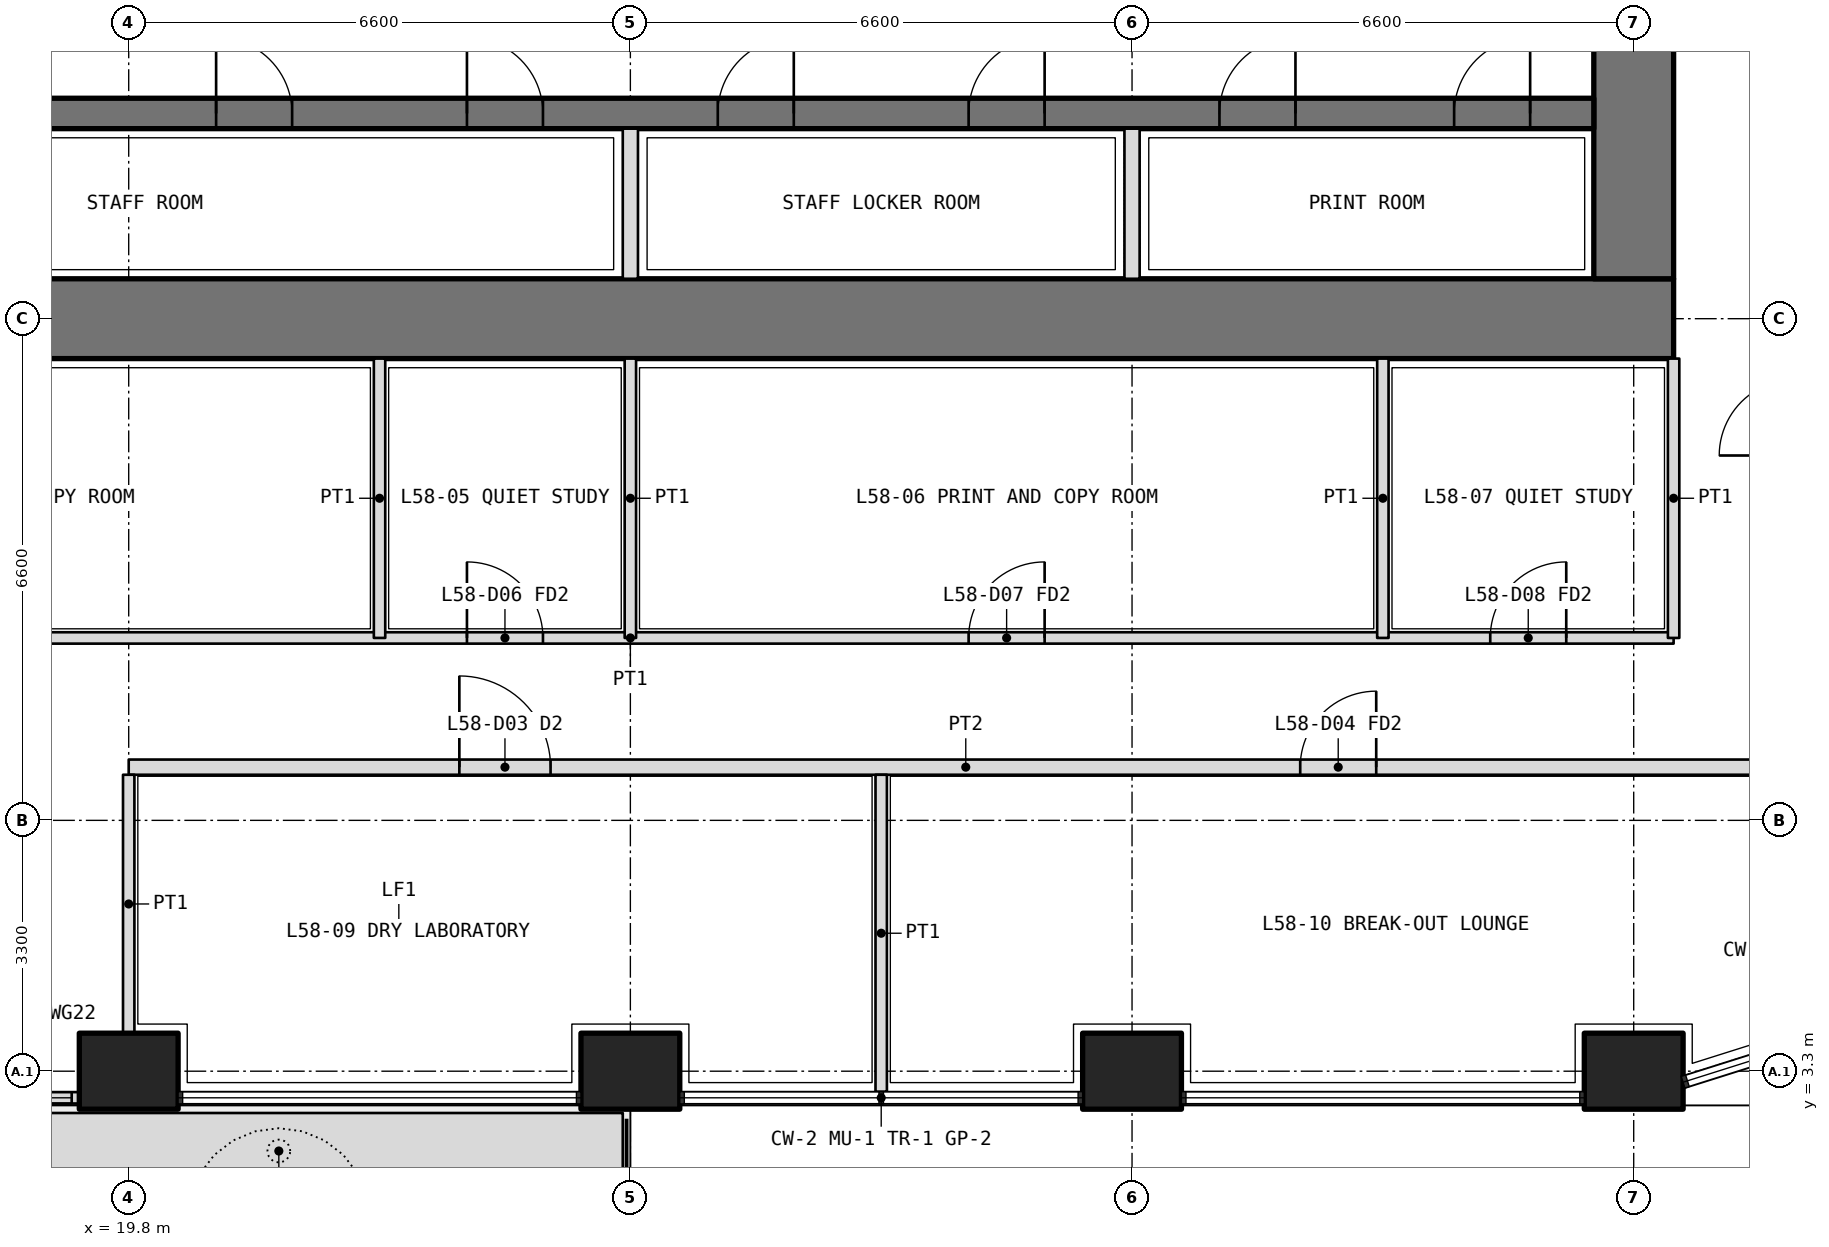
"""IFC4 building model, lengths in metres.
Left out: names, types, materials, properties, quantities, classifications, styles, units other than length and angle.
Written with IfcOpenShell. Run it as: python <this file> out.ifc"""

import sys

from ifc_helpers import new_model, si_unit, direction, frame, frame_2d, origin, origin_2d, place, context, subcontext, project, spatial, polyline, rectangle, outline, extrude, element, fill, save


model = new_model("IFC4")
c1 = context("Model", 3, precision=1e-05, world=origin(), true_north=direction((0.0, 1.0)))
c2 = subcontext(c1, "Body", "Model", "MODEL_VIEW")
j1 = project(units=[si_unit("LENGTHUNIT", "METRE"), si_unit("PLANEANGLEUNIT", "RADIAN")], contexts=[c1])
p1 = place(None, origin())
s1 = spatial("IfcSite", under=j1, at=p1, CompositionType="ELEMENT")
p2 = place(p1, origin())
s2 = spatial("IfcBuilding", under=s1, at=p2, CompositionType="ELEMENT")
p3 = place(p2, frame((0.0, 0.0, 254.4)))
s3 = spatial("IfcBuildingStorey", under=s2, at=p3, CompositionType="ELEMENT", Elevation=254.4)
for number, where, z_axis, x_axis in (
    (1, (19.8, 3.3, 0.0), (0.0, 0.0, 1.0), (1.0, 0.0, 0.0)),
    (2, (26.4, 3.3, 0.0), (0.0, 0.0, 1.0), (1.0, 0.0, 0.0)),
    (3, (33.0, 3.3, 0.0), (0.0, 0.0, 1.0), (1.0, 0.0, 0.0)),
    (4, (39.6, 3.3, 0.0), (0.0, 0.0, 1.0), (1.0, 0.0, 0.0)),
):
    element("IfcColumn", number, at=place(p3, frame(where, z_axis=z_axis, x_axis=x_axis)), inside=s3, PredefinedType="COLUMN", context=c2, shape_type="SweptSolid", body=[
        extrude(rectangle(XDim=1.3, YDim=1.0, at=origin_2d()), origin(), (0.0, 0.0, 1.0), 4.2),
    ])
p4 = place(p3, origin())
e5 = element("IfcWall", 5, at=p4, inside=s3, PredefinedType="USERDEFINED", context=c2, shape_type="SweptSolid", body=[
    extrude(outline(polyline([(17.25, 1.75), (26.3, 1.75), (26.3, 2.75), (17.25, 2.75), (17.25, 1.75)]), holes=[polyline([(17.4, 1.9), (26.15, 1.9), (26.15, 2.6), (17.4, 2.6), (17.4, 1.9)])]), origin(), (0.0, 0.0, 1.0), 1.05),
])
p5 = place(p3, frame((13.85, 2.95, 0.0), z_axis=(0.0, 0.0, 1.0), x_axis=(1.0, 0.0, 0.0)))
e6 = element("IfcWall", 6, at=p5, inside=s3, PredefinedType="SOLIDWALL", context=c2, shape_type="SweptSolid", body=[
    extrude(rectangle(XDim=5.3, YDim=0.15, at=frame_2d((2.65, 0.0))), origin(), (0.0, 0.0, 1.0), 2.7),
])
p6 = place(p5, frame((2.9, 0.0, 0.0)))
e7 = element("IfcOpeningElement", 7, at=p6, cuts=e6, PredefinedType="OPENING", context=c2, shape_type="SweptSolid", body=[
    extrude(rectangle(XDim=1.0, YDim=2.4, at=frame_2d((0.5, 1.2))), frame((0.0, 0.085, 0.0), z_axis=(0.0, -1.0, 0.0), x_axis=(1.0, 0.0, 0.0)), (0.0, 0.0, 1.0), 0.17),
])
p7 = place(p5, frame((0.1, 0.0, 0.1)))
e8 = element("IfcOpeningElement", 8, at=p7, cuts=e6, PredefinedType="OPENING", context=c2, shape_type="SweptSolid", body=[
    extrude(rectangle(XDim=2.3, YDim=2.3, at=frame_2d((1.15, 1.15))), frame((0.0, 0.085, 0.0), z_axis=(0.0, -1.0, 0.0), x_axis=(1.0, 0.0, 0.0)), (0.0, 0.0, 1.0), 0.17),
])
p8 = place(p5, frame((4.0, 0.0, 0.1)))
e9 = element("IfcOpeningElement", 9, at=p8, cuts=e6, PredefinedType="OPENING", context=c2, shape_type="SweptSolid", body=[
    extrude(rectangle(XDim=1.2, YDim=2.3, at=frame_2d((0.6, 1.15))), frame((0.0, 0.085, 0.0), z_axis=(0.0, -1.0, 0.0), x_axis=(1.0, 0.0, 0.0)), (0.0, 0.0, 1.0), 0.17),
])
p9 = place(p3, frame((12.675, 13.2, 0.0), z_axis=(0.0, 0.0, 1.0), x_axis=(1.0, 0.0, 0.0)))
e10 = element("IfcWall", 10, at=p9, inside=s3, PredefinedType="SHEAR", context=c2, shape_type="SweptSolid", body=[
    extrude(rectangle(XDim=27.45, YDim=1.05, at=frame_2d((13.725, 0.0))), origin(), (0.0, 0.0, 1.0), 4.2),
])
p10 = place(p3, frame((39.6, 13.725, 0.0), z_axis=(0.0, 0.0, 1.0), x_axis=(0.0, 1.0, 0.0)))
e11 = element("IfcWall", 11, at=p10, inside=s3, PredefinedType="SHEAR", context=c2, shape_type="SweptSolid", body=[
    extrude(rectangle(XDim=18.75, YDim=1.05, at=frame_2d((9.375, 0.0))), origin(), (0.0, 0.0, 1.0), 4.2),
])
p11 = place(p10, frame((3.025, 0.0, 0.0)))
e12 = element("IfcOpeningElement", 12, at=p11, cuts=e11, PredefinedType="OPENING", context=c2, shape_type="SweptSolid", body=[
    extrude(rectangle(XDim=1.6, YDim=2.1, at=frame_2d((0.8, 1.05))), frame((0.0, 0.535, 0.0), z_axis=(0.0, -1.0, 0.0), x_axis=(1.0, 0.0, 0.0)), (0.0, 0.0, 1.0), 1.07),
])
p12 = place(p10, frame((13.825, 0.0, 0.0)))
e13 = element("IfcOpeningElement", 13, at=p12, cuts=e11, PredefinedType="OPENING", context=c2, shape_type="SweptSolid", body=[
    extrude(rectangle(XDim=1.6, YDim=2.1, at=frame_2d((0.8, 1.05))), frame((0.0, 0.535, 0.0), z_axis=(0.0, -1.0, 0.0), x_axis=(1.0, 0.0, 0.0)), (0.0, 0.0, 1.0), 1.07),
])
p13 = place(p3, frame((13.725, 15.9, 0.0), z_axis=(0.0, 0.0, 1.0), x_axis=(1.0, 0.0, 0.0)))
e14 = element("IfcWall", 14, at=p13, inside=s3, PredefinedType="SHEAR", context=c2, shape_type="SweptSolid", body=[
    extrude(rectangle(XDim=25.35, YDim=0.4, at=frame_2d((12.675, 0.0))), origin(), (0.0, 0.0, 1.0), 4.2),
])
p14 = place(p13, frame((0.837, 0.0, 0.0)))
e15 = element("IfcOpeningElement", 15, at=p14, cuts=e14, PredefinedType="OPENING", context=c2, shape_type="SweptSolid", body=[
    extrude(rectangle(XDim=1.0, YDim=2.1, at=frame_2d((0.5, 1.05))), frame((0.0, 0.21, 0.0), z_axis=(0.0, -1.0, 0.0), x_axis=(1.0, 0.0, 0.0)), (0.0, 0.0, 1.0), 0.42),
])
p15 = place(p13, frame((3.925, 0.0, 0.0)))
e16 = element("IfcOpeningElement", 16, at=p15, cuts=e14, PredefinedType="OPENING", context=c2, shape_type="SweptSolid", body=[
    extrude(rectangle(XDim=1.0, YDim=2.1, at=frame_2d((0.5, 1.05))), frame((0.0, 0.21, 0.0), z_axis=(0.0, -1.0, 0.0), x_axis=(1.0, 0.0, 0.0)), (0.0, 0.0, 1.0), 0.42),
])
p16 = place(p13, frame((7.225, 0.0, 0.0)))
e17 = element("IfcOpeningElement", 17, at=p16, cuts=e14, PredefinedType="OPENING", context=c2, shape_type="SweptSolid", body=[
    extrude(rectangle(XDim=1.0, YDim=2.1, at=frame_2d((0.5, 1.05))), frame((0.0, 0.21, 0.0), z_axis=(0.0, -1.0, 0.0), x_axis=(1.0, 0.0, 0.0)), (0.0, 0.0, 1.0), 0.42),
])
p17 = place(p13, frame((10.525, 0.0, 0.0)))
e18 = element("IfcOpeningElement", 18, at=p17, cuts=e14, PredefinedType="OPENING", context=c2, shape_type="SweptSolid", body=[
    extrude(rectangle(XDim=1.0, YDim=2.1, at=frame_2d((0.5, 1.05))), frame((0.0, 0.21, 0.0), z_axis=(0.0, -1.0, 0.0), x_axis=(1.0, 0.0, 0.0)), (0.0, 0.0, 1.0), 0.42),
])
p18 = place(p13, frame((13.825, 0.0, 0.0)))
e19 = element("IfcOpeningElement", 19, at=p18, cuts=e14, PredefinedType="OPENING", context=c2, shape_type="SweptSolid", body=[
    extrude(rectangle(XDim=1.0, YDim=2.1, at=frame_2d((0.5, 1.05))), frame((0.0, 0.21, 0.0), z_axis=(0.0, -1.0, 0.0), x_axis=(1.0, 0.0, 0.0)), (0.0, 0.0, 1.0), 0.42),
])
p19 = place(p13, frame((17.125, 0.0, 0.0)))
e20 = element("IfcOpeningElement", 20, at=p19, cuts=e14, PredefinedType="OPENING", context=c2, shape_type="SweptSolid", body=[
    extrude(rectangle(XDim=1.0, YDim=2.1, at=frame_2d((0.5, 1.05))), frame((0.0, 0.21, 0.0), z_axis=(0.0, -1.0, 0.0), x_axis=(1.0, 0.0, 0.0)), (0.0, 0.0, 1.0), 0.42),
])
p20 = place(p13, frame((20.425, 0.0, 0.0)))
e21 = element("IfcOpeningElement", 21, at=p20, cuts=e14, PredefinedType="OPENING", context=c2, shape_type="SweptSolid", body=[
    extrude(rectangle(XDim=1.0, YDim=2.1, at=frame_2d((0.5, 1.05))), frame((0.0, 0.21, 0.0), z_axis=(0.0, -1.0, 0.0), x_axis=(1.0, 0.0, 0.0)), (0.0, 0.0, 1.0), 0.42),
])
p21 = place(p13, frame((23.512, 0.0, 0.0)))
e22 = element("IfcOpeningElement", 22, at=p21, cuts=e14, PredefinedType="OPENING", context=c2, shape_type="SweptSolid", body=[
    extrude(rectangle(XDim=1.0, YDim=2.1, at=frame_2d((0.5, 1.05))), frame((0.0, 0.21, 0.0), z_axis=(0.0, -1.0, 0.0), x_axis=(1.0, 0.0, 0.0)), (0.0, 0.0, 1.0), 0.42),
])
for number, where, z_axis, x_axis in (
    (23, (26.4, 13.725, 0.0), (0.0, 0.0, 1.0), (0.0, 1.0, 0.0)),
    (24, (33.0, 13.725, 0.0), (0.0, 0.0, 1.0), (0.0, 1.0, 0.0)),
):
    element("IfcWall", number, at=place(p3, frame(where, z_axis=z_axis, x_axis=x_axis)), inside=s3, PredefinedType="PARTITIONING", context=c2, shape_type="SweptSolid", body=[
        extrude(rectangle(XDim=1.975, YDim=0.2, at=frame_2d((0.987, 0.0))), origin(), (0.0, 0.0, 1.0), 4.2),
    ])
p22 = place(p3, frame((12.675, 9.0, 0.0), z_axis=(0.0, 0.0, 1.0), x_axis=(1.0, 0.0, 0.0)))
e25 = element("IfcWall", 25, at=p22, inside=s3, PredefinedType="PARTITIONING", context=c2, shape_type="SweptSolid", body=[
    extrude(rectangle(XDim=27.45, YDim=0.15, at=frame_2d((13.725, 0.0))), origin(), (0.0, 0.0, 1.0), 3.0),
])
p23 = place(p22, frame((4.712, 0.0, 0.0)))
e26 = element("IfcOpeningElement", 26, at=p23, cuts=e25, PredefinedType="OPENING", context=c2, shape_type="SweptSolid", body=[
    extrude(rectangle(XDim=1.0, YDim=2.1, at=frame_2d((0.5, 1.05))), frame((0.0, 0.085, 0.0), z_axis=(0.0, -1.0, 0.0), x_axis=(1.0, 0.0, 0.0)), (0.0, 0.0, 1.0), 0.17),
])
p24 = place(p22, frame((11.575, 0.0, 0.0)))
e27 = element("IfcOpeningElement", 27, at=p24, cuts=e25, PredefinedType="OPENING", context=c2, shape_type="SweptSolid", body=[
    extrude(rectangle(XDim=1.0, YDim=2.1, at=frame_2d((0.5, 1.05))), frame((0.0, 0.085, 0.0), z_axis=(0.0, -1.0, 0.0), x_axis=(1.0, 0.0, 0.0)), (0.0, 0.0, 1.0), 0.17),
])
p25 = place(p22, frame((18.175, 0.0, 0.0)))
e28 = element("IfcOpeningElement", 28, at=p25, cuts=e25, PredefinedType="OPENING", context=c2, shape_type="SweptSolid", body=[
    extrude(rectangle(XDim=1.0, YDim=2.1, at=frame_2d((0.5, 1.05))), frame((0.0, 0.085, 0.0), z_axis=(0.0, -1.0, 0.0), x_axis=(1.0, 0.0, 0.0)), (0.0, 0.0, 1.0), 0.17),
])
p26 = place(p22, frame((25.038, 0.0, 0.0)))
e29 = element("IfcOpeningElement", 29, at=p26, cuts=e25, PredefinedType="OPENING", context=c2, shape_type="SweptSolid", body=[
    extrude(rectangle(XDim=1.0, YDim=2.1, at=frame_2d((0.5, 1.05))), frame((0.0, 0.085, 0.0), z_axis=(0.0, -1.0, 0.0), x_axis=(1.0, 0.0, 0.0)), (0.0, 0.0, 1.0), 0.17),
])
p27 = place(p3, frame((40.125, 12.675, 0.0), z_axis=(0.0, 0.0, 1.0), x_axis=(0.0, -1.0, 0.0)))
e30 = element("IfcWall", 30, at=p27, inside=s3, PredefinedType="PARTITIONING", context=c2, shape_type="SweptSolid", body=[
    extrude(rectangle(XDim=3.675, YDim=0.15, at=frame_2d((1.837, 0.0))), origin(), (0.0, 0.0, 1.0), 3.0),
])
p28 = place(p3, frame((23.1, 12.675, 0.0), z_axis=(0.0, 0.0, 1.0), x_axis=(0.0, -1.0, 0.0)))
e31 = element("IfcWall", 31, at=p28, inside=s3, PredefinedType="PARTITIONING", context=c2, shape_type="SweptSolid", body=[
    extrude(rectangle(XDim=3.675, YDim=0.15, at=frame_2d((1.837, 0.0))), origin(), (0.0, 0.0, 1.0), 3.9),
])
p29 = place(p3, frame((26.4, 12.675, 0.0), z_axis=(0.0, 0.0, 1.0), x_axis=(0.0, -1.0, 0.0)))
e32 = element("IfcWall", 32, at=p29, inside=s3, PredefinedType="PARTITIONING", context=c2, shape_type="SweptSolid", body=[
    extrude(rectangle(XDim=3.675, YDim=0.15, at=frame_2d((1.837, 0.0))), origin(), (0.0, 0.0, 1.0), 3.0),
])
p30 = place(p3, frame((36.3, 12.675, 0.0), z_axis=(0.0, 0.0, 1.0), x_axis=(0.0, -1.0, 0.0)))
e33 = element("IfcWall", 33, at=p30, inside=s3, PredefinedType="PARTITIONING", context=c2, shape_type="SweptSolid", body=[
    extrude(rectangle(XDim=3.675, YDim=0.15, at=frame_2d((1.837, 0.0))), origin(), (0.0, 0.0, 1.0), 3.9),
])
p31 = place(p3, frame((19.8, 7.3, 0.0), z_axis=(0.0, 0.0, 1.0), x_axis=(1.0, 0.0, 0.0)))
e34 = element("IfcWall", 34, at=p31, inside=s3, PredefinedType="PARTITIONING", context=c2, shape_type="SweptSolid", body=[
    extrude(rectangle(XDim=22.025, YDim=0.2, at=frame_2d((11.012, 0.0))), origin(), (0.0, 0.0, 1.0), 3.0),
])
p32 = place(p31, frame((4.35, 0.0, 0.0)))
e35 = element("IfcOpeningElement", 35, at=p32, cuts=e34, PredefinedType="OPENING", context=c2, shape_type="SweptSolid", body=[
    extrude(rectangle(XDim=1.2, YDim=2.1, at=frame_2d((0.6, 1.05))), frame((0.0, 0.11, 0.0), z_axis=(0.0, -1.0, 0.0), x_axis=(1.0, 0.0, 0.0)), (0.0, 0.0, 1.0), 0.22),
])
p33 = place(p31, frame((15.413, 0.0, 0.0)))
e36 = element("IfcOpeningElement", 36, at=p33, cuts=e34, PredefinedType="OPENING", context=c2, shape_type="SweptSolid", body=[
    extrude(rectangle(XDim=1.0, YDim=2.1, at=frame_2d((0.5, 1.05))), frame((0.0, 0.11, 0.0), z_axis=(0.0, -1.0, 0.0), x_axis=(1.0, 0.0, 0.0)), (0.0, 0.0, 1.0), 0.22),
])
p34 = place(p3, frame((19.8, 3.8, 0.0), z_axis=(0.0, 0.0, 1.0), x_axis=(0.0, 1.0, 0.0)))
e37 = element("IfcWall", 37, at=p34, inside=s3, PredefinedType="PARTITIONING", context=c2, shape_type="SweptSolid", body=[
    extrude(rectangle(XDim=3.4, YDim=0.15, at=frame_2d((1.7, 0.0))), origin(), (0.0, 0.0, 1.0), 3.0),
])
p35 = place(p3, frame((29.7, 3.03, 0.0), z_axis=(0.0, 0.0, 1.0), x_axis=(0.0, 1.0, 0.0)))
e38 = element("IfcWall", 38, at=p35, inside=s3, PredefinedType="PARTITIONING", context=c2, shape_type="SweptSolid", body=[
    extrude(rectangle(XDim=4.17, YDim=0.15, at=frame_2d((2.085, 0.0))), origin(), (0.0, 0.0, 1.0), 2.7),
])
p36 = place(p8, origin())
e39 = element("IfcWindow", 39, at=p36, inside=s3, PartitioningType="SINGLE_PANEL", PredefinedType="WINDOW", context=c2, shape_type="SweptSolid", body=[
    extrude(rectangle(XDim=1.2, YDim=2.3, at=frame_2d((0.6, 1.15))), frame((0.0, 0.03, 0.0), z_axis=(0.0, -1.0, 0.0), x_axis=(1.0, 0.0, 0.0)), (0.0, 0.0, 1.0), 0.06),
])
fill(e9, e39)
p37 = place(p24, origin())
e40 = element("IfcDoor", 40, at=p37, inside=s3, OperationType="SINGLE_SWING_LEFT", PredefinedType="DOOR", context=c2, shape_type="SweptSolid", body=[
    extrude(rectangle(XDim=1.0, YDim=2.1, at=frame_2d((0.5, 1.05))), frame((0.0, 0.025, 0.0), z_axis=(0.0, -1.0, 0.0), x_axis=(1.0, 0.0, 0.0)), (0.0, 0.0, 1.0), 0.05),
])
fill(e27, e40)
p38 = place(p25, origin())
e41 = element("IfcDoor", 41, at=p38, inside=s3, OperationType="SINGLE_SWING_RIGHT", PredefinedType="DOOR", context=c2, shape_type="SweptSolid", body=[
    extrude(rectangle(XDim=1.0, YDim=2.1, at=frame_2d((0.5, 1.05))), frame((0.0, 0.025, 0.0), z_axis=(0.0, -1.0, 0.0), x_axis=(1.0, 0.0, 0.0)), (0.0, 0.0, 1.0), 0.05),
])
fill(e28, e41)
p39 = place(p26, origin())
e42 = element("IfcDoor", 42, at=p39, inside=s3, OperationType="SINGLE_SWING_RIGHT", PredefinedType="DOOR", context=c2, shape_type="SweptSolid", body=[
    extrude(rectangle(XDim=1.0, YDim=2.1, at=frame_2d((0.5, 1.05))), frame((0.0, 0.025, 0.0), z_axis=(0.0, -1.0, 0.0), x_axis=(1.0, 0.0, 0.0)), (0.0, 0.0, 1.0), 0.05),
])
fill(e29, e42)
p40 = place(p32, origin())
e43 = element("IfcDoor", 43, at=p40, inside=s3, OperationType="DOUBLE_DOOR_SINGLE_SWING", PredefinedType="DOOR", context=c2, shape_type="SweptSolid", body=[
    extrude(rectangle(XDim=1.2, YDim=2.1, at=frame_2d((0.6, 1.05))), frame((0.0, 0.025, 0.0), z_axis=(0.0, -1.0, 0.0), x_axis=(1.0, 0.0, 0.0)), (0.0, 0.0, 1.0), 0.05),
])
fill(e35, e43)
p41 = place(p33, origin())
e44 = element("IfcDoor", 44, at=p41, inside=s3, OperationType="SINGLE_SWING_RIGHT", PredefinedType="DOOR", context=c2, shape_type="SweptSolid", body=[
    extrude(rectangle(XDim=1.0, YDim=2.1, at=frame_2d((0.5, 1.05))), frame((0.0, 0.025, 0.0), z_axis=(0.0, -1.0, 0.0), x_axis=(1.0, 0.0, 0.0)), (0.0, 0.0, 1.0), 0.05),
])
fill(e36, e44)
p42 = place(p16, origin())
e45 = element("IfcDoor", 45, at=p42, inside=s3, OperationType="SINGLE_SWING_LEFT", PredefinedType="DOOR", context=c2, shape_type="SweptSolid", body=[
    extrude(rectangle(XDim=1.0, YDim=2.1, at=frame_2d((0.5, 1.05))), frame((0.0, 0.025, 0.0), z_axis=(0.0, -1.0, 0.0), x_axis=(1.0, 0.0, 0.0)), (0.0, 0.0, 1.0), 0.05),
])
fill(e17, e45)
p43 = place(p17, origin())
e46 = element("IfcDoor", 46, at=p43, inside=s3, OperationType="SINGLE_SWING_LEFT", PredefinedType="DOOR", context=c2, shape_type="SweptSolid", body=[
    extrude(rectangle(XDim=1.0, YDim=2.1, at=frame_2d((0.5, 1.05))), frame((0.0, 0.025, 0.0), z_axis=(0.0, -1.0, 0.0), x_axis=(1.0, 0.0, 0.0)), (0.0, 0.0, 1.0), 0.05),
])
fill(e18, e46)
p44 = place(p18, origin())
e47 = element("IfcDoor", 47, at=p44, inside=s3, OperationType="SINGLE_SWING_RIGHT", PredefinedType="DOOR", context=c2, shape_type="SweptSolid", body=[
    extrude(rectangle(XDim=1.0, YDim=2.1, at=frame_2d((0.5, 1.05))), frame((0.0, 0.025, 0.0), z_axis=(0.0, -1.0, 0.0), x_axis=(1.0, 0.0, 0.0)), (0.0, 0.0, 1.0), 0.05),
])
fill(e19, e47)
p45 = place(p19, origin())
e48 = element("IfcDoor", 48, at=p45, inside=s3, OperationType="SINGLE_SWING_RIGHT", PredefinedType="DOOR", context=c2, shape_type="SweptSolid", body=[
    extrude(rectangle(XDim=1.0, YDim=2.1, at=frame_2d((0.5, 1.05))), frame((0.0, 0.025, 0.0), z_axis=(0.0, -1.0, 0.0), x_axis=(1.0, 0.0, 0.0)), (0.0, 0.0, 1.0), 0.05),
])
fill(e20, e48)
p46 = place(p20, origin())
e49 = element("IfcDoor", 49, at=p46, inside=s3, OperationType="SINGLE_SWING_RIGHT", PredefinedType="DOOR", context=c2, shape_type="SweptSolid", body=[
    extrude(rectangle(XDim=1.0, YDim=2.1, at=frame_2d((0.5, 1.05))), frame((0.0, 0.025, 0.0), z_axis=(0.0, -1.0, 0.0), x_axis=(1.0, 0.0, 0.0)), (0.0, 0.0, 1.0), 0.05),
])
fill(e21, e49)
p47 = place(p21, origin())
e50 = element("IfcDoor", 50, at=p47, inside=s3, OperationType="SINGLE_SWING_RIGHT", PredefinedType="DOOR", context=c2, shape_type="SweptSolid", body=[
    extrude(rectangle(XDim=1.0, YDim=2.1, at=frame_2d((0.5, 1.05))), frame((0.0, 0.025, 0.0), z_axis=(0.0, -1.0, 0.0), x_axis=(1.0, 0.0, 0.0)), (0.0, 0.0, 1.0), 0.05),
])
fill(e22, e50)
save(model, sys.argv[1])
